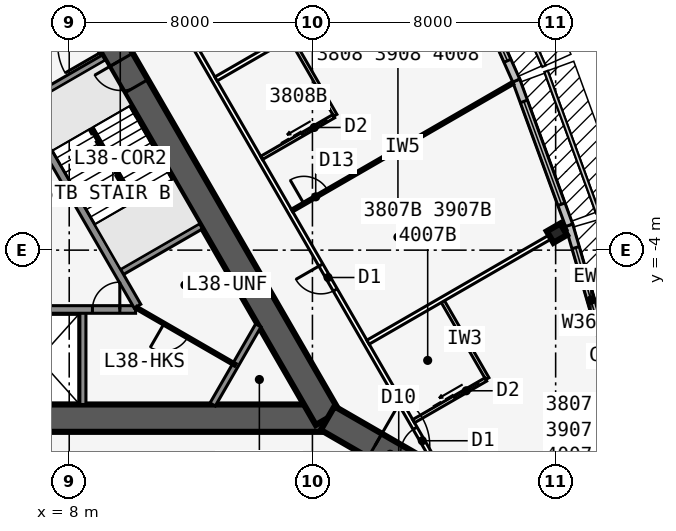
"""IFC4 building model, lengths in metres.
Left out: names, types, materials, properties, quantities, classifications, styles, units other than length and angle.
Written with IfcOpenShell. Run it as: python <this file> out.ifc"""

import sys

from ifc_helpers import new_model, si_unit, direction, frame, frame_2d, origin, origin_2d, place, context, subcontext, project, spatial, rectangle, i_section, extrude, element, fill, save


model = new_model("IFC4")
c1 = context("Model", 3, precision=1e-05, world=origin(), true_north=direction((0.0, 1.0)))
c2 = subcontext(c1, "Body", "Model", "MODEL_VIEW")
j1 = project(units=[si_unit("LENGTHUNIT", "METRE"), si_unit("PLANEANGLEUNIT", "RADIAN")], contexts=[c1])
p1 = place(None, origin())
s1 = spatial("IfcSite", under=j1, at=p1, CompositionType="ELEMENT")
p2 = place(p1, origin())
s2 = spatial("IfcBuilding", under=s1, at=p2, CompositionType="ELEMENT")
p3 = place(p2, frame((0.0, 0.0, 145.3)))
s3 = spatial("IfcBuildingStorey", under=s2, at=p3, CompositionType="ELEMENT", Elevation=145.3)
p4 = place(p3, frame((-16.5, -9.526, 0.0), z_axis=(0.0, 0.0, 1.0), x_axis=(1.0, 0.0, 0.0)))
e1 = element("IfcWall", 1, at=p4, inside=s3, PredefinedType="SHEAR", context=c2, shape_type="SweptSolid", body=[
    extrude(rectangle(XDim=33.0, YDim=0.9, at=frame_2d((16.5, 0.0))), origin(), (0.0, 0.0, 1.0), 3.4),
])
p5 = place(p4, frame((14.05, 0.0, 0.0)))
e2 = element("IfcOpeningElement", 2, at=p5, cuts=e1, PredefinedType="OPENING", context=c2, shape_type="SweptSolid", body=[
    extrude(rectangle(XDim=1.8, YDim=2.13, at=frame_2d((0.9, 1.065))), frame((0.0, 0.46, 0.0), z_axis=(0.0, -1.0, 0.0), x_axis=(1.0, 0.0, 0.0)), (0.0, 0.0, 1.0), 0.92),
])
p6 = place(p3, frame((-0.55, -5.951, 0.0), z_axis=(0.0, 0.0, 1.0), x_axis=(1.0, 0.0, 0.0)))
e3 = element("IfcWall", 3, at=p6, inside=s3, PredefinedType="SOLIDWALL", context=c2, shape_type="SweptSolid", body=[
    extrude(rectangle(XDim=10.733, YDim=0.25, at=frame_2d((5.366, 0.0))), origin(), (0.0, 0.0, 1.0), 3.235),
])
p7 = place(p6, frame((9.314, 0.0, 0.0)))
e4 = element("IfcOpeningElement", 4, at=p7, cuts=e3, PredefinedType="OPENING", context=c2, shape_type="SweptSolid", body=[
    extrude(rectangle(XDim=0.9, YDim=2.13, at=frame_2d((0.45, 1.065))), frame((0.0, 0.135, 0.0), z_axis=(0.0, -1.0, 0.0), x_axis=(1.0, 0.0, 0.0)), (0.0, 0.0, 1.0), 0.27),
])
p8 = place(p6, frame((1.05, 0.0, 0.0)))
e5 = element("IfcOpeningElement", 5, at=p8, cuts=e3, PredefinedType="OPENING", context=c2, shape_type="SweptSolid", body=[
    extrude(rectangle(XDim=1.1, YDim=2.13, at=frame_2d((0.55, 1.065))), frame((0.0, 0.135, 0.0), z_axis=(0.0, -1.0, 0.0), x_axis=(1.0, 0.0, 0.0)), (0.0, 0.0, 1.0), 0.27),
])
p9 = place(p6, frame((4.05, 0.0, 0.0)))
e6 = element("IfcOpeningElement", 6, at=p9, cuts=e3, PredefinedType="OPENING", context=c2, shape_type="SweptSolid", body=[
    extrude(rectangle(XDim=1.1, YDim=2.13, at=frame_2d((0.55, 1.065))), frame((0.0, 0.135, 0.0), z_axis=(0.0, -1.0, 0.0), x_axis=(1.0, 0.0, 0.0)), (0.0, 0.0, 1.0), 0.27),
])
p10 = place(p3, frame((8.45, -5.951, 0.0), z_axis=(0.0, 0.0, 1.0), x_axis=(0.0, -1.0, 0.0)))
e7 = element("IfcWall", 7, at=p10, inside=s3, PredefinedType="SOLIDWALL", context=c2, shape_type="SweptSolid", body=[
    extrude(rectangle(XDim=3.125, YDim=0.2, at=frame_2d((1.562, 0.0))), origin(), (0.0, 0.0, 1.0), 3.235),
])
p11 = place(p3, frame((16.5, -9.526, 0.0), z_axis=(0.0, 0.0, 1.0), x_axis=(-0.499999749417, 0.866025548458, 0.0)))
e8 = element("IfcWall", 8, at=p11, inside=s3, PredefinedType="SHEAR", context=c2, shape_type="SweptSolid", body=[
    extrude(rectangle(XDim=33.0, YDim=0.9, at=frame_2d((16.5, 0.0))), origin(), (0.0, 0.0, 1.0), 3.4),
])
p12 = place(p11, frame((14.15, 0.0, 0.0)))
e9 = element("IfcOpeningElement", 9, at=p12, cuts=e8, PredefinedType="OPENING", context=c2, shape_type="SweptSolid", body=[
    extrude(rectangle(XDim=1.8, YDim=2.13, at=frame_2d((0.9, 1.065))), frame((0.0, 0.46, 0.0), z_axis=(0.0, -1.0, 0.0), x_axis=(1.0, 0.0, 0.0)), (0.0, 0.0, 1.0), 0.92),
])
p13 = place(p11, frame((12.6, 0.0, 0.0)))
e10 = element("IfcOpeningElement", 10, at=p13, cuts=e8, PredefinedType="OPENING", context=c2, shape_type="SweptSolid", body=[
    extrude(rectangle(XDim=1.0, YDim=2.13, at=frame_2d((0.5, 1.065))), frame((0.0, 0.46, 0.0), z_axis=(0.0, -1.0, 0.0), x_axis=(1.0, 0.0, 0.0)), (0.0, 0.0, 1.0), 0.92),
])
p14 = place(p3, frame((10.245, -5.843, 0.0), z_axis=(0.0, 0.0, 1.0), x_axis=(-0.499993009313, 0.866029439822, 0.0)))
e11 = element("IfcWall", 11, at=p14, inside=s3, PredefinedType="SOLIDWALL", context=c2, shape_type="SweptSolid", body=[
    extrude(rectangle(XDim=7.733, YDim=0.25, at=frame_2d((3.866, 0.0))), origin(), (0.0, 0.0, 1.0), 3.235),
])
for number, where, z_axis, x_axis in (
    (12, (9.629, -4.775, 0.0), (0.0, 0.0, 1.0), (0.866, 0.5, 0.0)),
    (13, (6.429, 0.767, 0.0), (0.0, 0.0, 1.0), (0.866, 0.5, 0.0)),
):
    element("IfcWall", number, at=place(p3, frame(where, z_axis=z_axis, x_axis=x_axis)), inside=s3, PredefinedType="SOLIDWALL", context=c2, shape_type="SweptSolid", body=[
        extrude(rectangle(XDim=3.125, YDim=0.2, at=frame_2d((1.562, 0.0))), origin(), (0.0, 0.0, 1.0), 3.235),
    ])
p15 = place(p3, frame((16.5, -9.526, 0.0), z_axis=(0.0, 0.0, 1.0), x_axis=(0.866031398331, -0.499989616998, 0.0)))
e14 = element("IfcWall", 14, at=p15, inside=s3, PredefinedType="SHEAR", context=c2, shape_type="SweptSolid", body=[
    extrude(rectangle(XDim=4.746, YDim=0.9, at=frame_2d((2.373, 0.0))), origin(), (0.0, 0.0, 1.0), 3.4),
])
p16 = place(p15, frame((1.8, 0.0, 0.0)))
e15 = element("IfcOpeningElement", 15, at=p16, cuts=e14, PredefinedType="OPENING", context=c2, shape_type="SweptSolid", body=[
    extrude(rectangle(XDim=1.8, YDim=2.13, at=frame_2d((0.9, 1.065))), frame((0.0, 0.46, 0.0), z_axis=(0.0, -1.0, 0.0), x_axis=(1.0, 0.0, 0.0)), (0.0, 0.0, 1.0), 0.92),
])
p17 = place(p3, frame((24.041, -3.44, 0.0), z_axis=(0.0, 0.0, 1.0), x_axis=(-0.5, 0.866025403784, 0.0)))
e16 = element("IfcColumn", 16, at=p17, inside=s3, PredefinedType="COLUMN", context=c2, shape_type="SweptSolid", body=[
    extrude(i_section(OverallWidth=0.437, OverallDepth=0.513, WebThickness=0.061, FlangeThickness=0.097, at=origin_2d()), origin(), (0.0, 0.0, 1.0), 3.4),
])
p18 = place(p3, frame((25.88, -8.118, 0.0), z_axis=(0.0, 0.0, 1.0), x_axis=(-0.279528287117, 0.960137457191, 0.0)))
e17 = element("IfcWall", 17, at=p18, inside=s3, PredefinedType="STANDARD", context=c2, shape_type="SweptSolid", body=[
    extrude(rectangle(XDim=5.148, YDim=0.25, at=frame_2d((2.574, 0.0))), origin(), (0.0, 0.0, 1.0), 3.235),
])
p19 = place(p18, frame((0.774, 0.0, 0.45)))
e18 = element("IfcOpeningElement", 18, at=p19, cuts=e17, PredefinedType="OPENING", context=c2, shape_type="SweptSolid", body=[
    extrude(rectangle(XDim=3.6, YDim=2.4, at=frame_2d((1.8, 1.2))), frame((0.0, 0.135, 0.0), z_axis=(0.0, -1.0, 0.0), x_axis=(1.0, 0.0, 0.0)), (0.0, 0.0, 1.0), 0.27),
])
p20 = place(p3, frame((24.444, -3.183, 0.0), z_axis=(0.0, 0.0, 1.0), x_axis=(-0.343225593282, 0.939252996863, 0.0)))
e19 = element("IfcWall", 19, at=p20, inside=s3, PredefinedType="STANDARD", context=c2, shape_type="SweptSolid", body=[
    extrude(rectangle(XDim=5.076, YDim=0.25, at=frame_2d((2.538, 0.0))), origin(), (0.0, 0.0, 1.0), 3.235),
])
p21 = place(p20, frame((0.738, 0.0, 0.45)))
e20 = element("IfcOpeningElement", 20, at=p21, cuts=e19, PredefinedType="OPENING", context=c2, shape_type="SweptSolid", body=[
    extrude(rectangle(XDim=3.6, YDim=2.4, at=frame_2d((1.8, 1.2))), frame((0.0, 0.135, 0.0), z_axis=(0.0, -1.0, 0.0), x_axis=(1.0, 0.0, 0.0)), (0.0, 0.0, 1.0), 0.27),
])
p22 = place(p3, frame((22.705, 1.576, 0.0), z_axis=(0.0, 0.0, 1.0), x_axis=(-0.406832200364, 0.913502906808, 0.0)))
e21 = element("IfcWall", 21, at=p22, inside=s3, PredefinedType="STANDARD", context=c2, shape_type="SweptSolid", body=[
    extrude(rectangle(XDim=5.028, YDim=0.25, at=frame_2d((2.514, 0.0))), origin(), (0.0, 0.0, 1.0), 3.235),
])
p23 = place(p22, frame((0.714, 0.0, 0.45)))
e22 = element("IfcOpeningElement", 22, at=p23, cuts=e21, PredefinedType="OPENING", context=c2, shape_type="SweptSolid", body=[
    extrude(rectangle(XDim=3.6, YDim=2.4, at=frame_2d((1.8, 1.2))), frame((0.0, 0.135, 0.0), z_axis=(0.0, -1.0, 0.0), x_axis=(1.0, 0.0, 0.0)), (0.0, 0.0, 1.0), 0.27),
])
p24 = place(p3, frame((20.027, -10.985, 0.0), z_axis=(0.0, 0.0, 1.0), x_axis=(-0.500001677587, 0.866024435227, 0.0)))
e23 = element("IfcWall", 23, at=p24, inside=s3, PredefinedType="PARTITIONING", context=c2, shape_type="SweptSolid", body=[
    extrude(rectangle(XDim=39.054, YDim=0.15, at=frame_2d((19.527, 0.0))), origin(), (0.0, 0.0, 1.0), 3.235),
])
p25 = place(p24, frame((0.352, 0.0, 0.0)))
e24 = element("IfcOpeningElement", 24, at=p25, cuts=e23, PredefinedType="OPENING", context=c2, shape_type="SweptSolid", body=[
    extrude(rectangle(XDim=0.95, YDim=2.13, at=frame_2d((0.475, 1.065))), frame((0.0, 0.085, 0.0), z_axis=(0.0, -1.0, 0.0), x_axis=(1.0, 0.0, 0.0)), (0.0, 0.0, 1.0), 0.17),
])
p26 = place(p24, frame((6.552, 0.0, 0.0)))
e25 = element("IfcOpeningElement", 25, at=p26, cuts=e23, PredefinedType="OPENING", context=c2, shape_type="SweptSolid", body=[
    extrude(rectangle(XDim=0.95, YDim=2.13, at=frame_2d((0.475, 1.065))), frame((0.0, 0.085, 0.0), z_axis=(0.0, -1.0, 0.0), x_axis=(1.0, 0.0, 0.0)), (0.0, 0.0, 1.0), 0.17),
])
p27 = place(p24, frame((17.152, 0.0, 0.0)))
e26 = element("IfcOpeningElement", 26, at=p27, cuts=e23, PredefinedType="OPENING", context=c2, shape_type="SweptSolid", body=[
    extrude(rectangle(XDim=0.95, YDim=2.13, at=frame_2d((0.475, 1.065))), frame((0.0, 0.085, 0.0), z_axis=(0.0, -1.0, 0.0), x_axis=(1.0, 0.0, 0.0)), (0.0, 0.0, 1.0), 0.17),
])
p28 = place(p24, frame((21.552, 0.0, 0.0)))
e27 = element("IfcOpeningElement", 27, at=p28, cuts=e23, PredefinedType="OPENING", context=c2, shape_type="SweptSolid", body=[
    extrude(rectangle(XDim=0.95, YDim=2.13, at=frame_2d((0.475, 1.065))), frame((0.0, 0.085, 0.0), z_axis=(0.0, -1.0, 0.0), x_axis=(1.0, 0.0, 0.0)), (0.0, 0.0, 1.0), 0.17),
])
p29 = place(p24, frame((32.152, 0.0, 0.0)))
e28 = element("IfcOpeningElement", 28, at=p29, cuts=e23, PredefinedType="OPENING", context=c2, shape_type="SweptSolid", body=[
    extrude(rectangle(XDim=0.95, YDim=2.13, at=frame_2d((0.475, 1.065))), frame((0.0, 0.085, 0.0), z_axis=(0.0, -1.0, 0.0), x_axis=(1.0, 0.0, 0.0)), (0.0, 0.0, 1.0), 0.17),
])
p30 = place(p24, frame((37.752, 0.0, 0.0)))
e29 = element("IfcOpeningElement", 29, at=p30, cuts=e23, PredefinedType="OPENING", context=c2, shape_type="SweptSolid", body=[
    extrude(rectangle(XDim=0.95, YDim=2.13, at=frame_2d((0.475, 1.065))), frame((0.0, 0.085, 0.0), z_axis=(0.0, -1.0, 0.0), x_axis=(1.0, 0.0, 0.0)), (0.0, 0.0, 1.0), 0.17),
])
p31 = place(p3, frame((17.829, -7.027, 0.0), z_axis=(0.0, 0.0, 1.0), x_axis=(0.866029804378, 0.499992377871, 0.0)))
e30 = element("IfcWall", 30, at=p31, inside=s3, PredefinedType="PARTITIONING", context=c2, shape_type="SweptSolid", body=[
    extrude(rectangle(XDim=7.516, YDim=0.15, at=frame_2d((3.758, 0.0))), origin(), (0.0, 0.0, 1.0), 2.389),
])
p32 = place(p3, frame((15.329, -2.697, 0.0), z_axis=(0.0, 0.0, 1.0), x_axis=(0.866024316602, 0.50000188305, 0.0)))
e31 = element("IfcWall", 31, at=p32, inside=s3, PredefinedType="PARTITIONING", context=c2, shape_type="SweptSolid", body=[
    extrude(rectangle(XDim=8.395, YDim=0.1, at=frame_2d((4.198, 0.0))), origin(), (0.0, 0.0, 1.0), 2.389),
])
p33 = place(p32, frame((0.45, 0.0, 0.0)))
e32 = element("IfcOpeningElement", 32, at=p33, cuts=e31, PredefinedType="OPENING", context=c2, shape_type="SweptSolid", body=[
    extrude(rectangle(XDim=0.9, YDim=2.13, at=frame_2d((0.45, 1.065))), frame((0.0, 0.06, 0.0), z_axis=(0.0, -1.0, 0.0), x_axis=(1.0, 0.0, 0.0)), (0.0, 0.0, 1.0), 0.12),
])
p34 = place(p3, frame((12.829, 1.633, 0.0), z_axis=(0.0, 0.0, 1.0), x_axis=(0.866027015393, 0.499997208602, 0.0)))
e33 = element("IfcWall", 33, at=p34, inside=s3, PredefinedType="PARTITIONING", context=c2, shape_type="SweptSolid", body=[
    extrude(rectangle(XDim=8.922, YDim=0.15, at=frame_2d((4.461, 0.0))), origin(), (0.0, 0.0, 1.0), 2.389),
])
p35 = place(p3, frame((21.753, -8.225, 0.0), z_axis=(0.0, 0.0, 1.0), x_axis=(-0.499990139034, 0.866031096941, 0.0)))
e34 = element("IfcWall", 34, at=p35, inside=s3, PredefinedType="PLUMBINGWALL", context=c2, shape_type="SweptSolid", body=[
    extrude(rectangle(XDim=3.0, YDim=0.12, at=frame_2d((1.5, 0.0))), origin(), (0.0, 0.0, 1.0), 3.235),
])
p36 = place(p3, frame((19.329, -9.625, 0.0), z_axis=(0.0, 0.0, 1.0), x_axis=(0.866035715982, 0.499982138324, 0.0)))
e35 = element("IfcWall", 35, at=p36, inside=s3, PredefinedType="PLUMBINGWALL", context=c2, shape_type="SweptSolid", body=[
    extrude(rectangle(XDim=2.74, YDim=0.12, at=frame_2d((1.37, 0.0))), origin(), (0.0, 0.0, 1.0), 3.235),
])
p37 = place(p36, frame((1.55, 0.0, 0.0)))
e36 = element("IfcOpeningElement", 36, at=p37, cuts=e35, PredefinedType="OPENING", context=c2, shape_type="SweptSolid", body=[
    extrude(rectangle(XDim=0.9, YDim=2.13, at=frame_2d((0.45, 1.065))), frame((0.0, 0.07, 0.0), z_axis=(0.0, -1.0, 0.0), x_axis=(1.0, 0.0, 0.0)), (0.0, 0.0, 1.0), 0.14),
])
p38 = place(p3, frame((16.753, 0.435, 0.0), z_axis=(0.0, 0.0, 1.0), x_axis=(-0.499990139034, 0.866031096941, 0.0)))
e37 = element("IfcWall", 37, at=p38, inside=s3, PredefinedType="PLUMBINGWALL", context=c2, shape_type="SweptSolid", body=[
    extrude(rectangle(XDim=3.0, YDim=0.12, at=frame_2d((1.5, 0.0))), origin(), (0.0, 0.0, 1.0), 3.235),
])
p39 = place(p3, frame((14.329, -0.965, 0.0), z_axis=(0.0, 0.0, 1.0), x_axis=(0.866035715982, 0.499982138324, 0.0)))
e38 = element("IfcWall", 38, at=p39, inside=s3, PredefinedType="PLUMBINGWALL", context=c2, shape_type="SweptSolid", body=[
    extrude(rectangle(XDim=2.74, YDim=0.12, at=frame_2d((1.37, 0.0))), origin(), (0.0, 0.0, 1.0), 3.235),
])
p40 = place(p39, frame((1.55, 0.0, 0.0)))
e39 = element("IfcOpeningElement", 39, at=p40, cuts=e38, PredefinedType="OPENING", context=c2, shape_type="SweptSolid", body=[
    extrude(rectangle(XDim=0.9, YDim=2.13, at=frame_2d((0.45, 1.065))), frame((0.0, 0.07, 0.0), z_axis=(0.0, -1.0, 0.0), x_axis=(1.0, 0.0, 0.0)), (0.0, 0.0, 1.0), 0.14),
])
p41 = place(p3, frame((14.219, -6.476, 0.0), z_axis=(0.0, 0.0, 1.0), x_axis=(-0.499952404951, -0.866052881055, 0.0)))
e40 = element("IfcWall", 40, at=p41, inside=s3, PredefinedType="SOLIDWALL", context=c2, shape_type="SweptSolid", body=[
    extrude(rectangle(XDim=3.002, YDim=0.2, at=frame_2d((1.501, 0.0))), origin(), (0.0, 0.0, 1.0), 3.235),
])
p42 = place(p3, frame((13.469, -7.776, 0.0), z_axis=(0.0, 0.0, 1.0), x_axis=(-0.866021898093, 0.500006071987, 0.0)))
e41 = element("IfcWall", 41, at=p42, inside=s3, PredefinedType="PARTITIONING", context=c2, shape_type="SweptSolid", body=[
    extrude(rectangle(XDim=3.775, YDim=0.1, at=frame_2d((1.888, 0.0))), origin(), (0.0, 0.0, 1.0), 3.235),
])
p43 = place(p42, frame((1.815, 0.0, 0.0)))
e42 = element("IfcOpeningElement", 42, at=p43, cuts=e41, PredefinedType="OPENING", context=c2, shape_type="SweptSolid", body=[
    extrude(rectangle(XDim=0.9, YDim=2.13, at=frame_2d((0.45, 1.065))), frame((0.0, 0.06, 0.0), z_axis=(0.0, -1.0, 0.0), x_axis=(1.0, 0.0, 0.0)), (0.0, 0.0, 1.0), 0.12),
])
p44 = place(p3, frame((10.135, -2.401, 0.0), z_axis=(0.0, 0.0, 1.0), x_axis=(-0.499992232847, 0.866029888106, 0.0)))
e43 = element("IfcWall", 43, at=p44, inside=s3, PredefinedType="SOLIDWALL", context=c2, shape_type="SweptSolid", body=[
    extrude(rectangle(XDim=2.794, YDim=0.1, at=frame_2d((1.397, 0.0))), origin(), (0.0, 0.0, 1.0), 3.4),
])
p45 = place(p19, origin())
e44 = element("IfcWindow", 44, at=p45, inside=s3, PartitioningType="SINGLE_PANEL", PredefinedType="WINDOW", context=c2, shape_type="SweptSolid", body=[
    extrude(rectangle(XDim=3.6, YDim=2.4, at=frame_2d((1.8, 1.2))), frame((0.0, 0.03, 0.0), z_axis=(0.0, -1.0, 0.0), x_axis=(1.0, 0.0, 0.0)), (0.0, 0.0, 1.0), 0.06),
])
fill(e18, e44)
p46 = place(p21, origin())
e45 = element("IfcWindow", 45, at=p46, inside=s3, PartitioningType="SINGLE_PANEL", PredefinedType="WINDOW", context=c2, shape_type="SweptSolid", body=[
    extrude(rectangle(XDim=3.6, YDim=2.4, at=frame_2d((1.8, 1.2))), frame((0.0, 0.03, 0.0), z_axis=(0.0, -1.0, 0.0), x_axis=(1.0, 0.0, 0.0)), (0.0, 0.0, 1.0), 0.06),
])
fill(e20, e45)
p47 = place(p23, origin())
e46 = element("IfcWindow", 46, at=p47, inside=s3, PartitioningType="SINGLE_PANEL", PredefinedType="WINDOW", context=c2, shape_type="SweptSolid", body=[
    extrude(rectangle(XDim=3.6, YDim=2.4, at=frame_2d((1.8, 1.2))), frame((0.0, 0.03, 0.0), z_axis=(0.0, -1.0, 0.0), x_axis=(1.0, 0.0, 0.0)), (0.0, 0.0, 1.0), 0.06),
])
fill(e22, e46)
p48 = place(p33, origin())
e47 = element("IfcDoor", 47, at=p48, inside=s3, OperationType="SINGLE_SWING_LEFT", PredefinedType="DOOR", context=c2, shape_type="SweptSolid", body=[
    extrude(rectangle(XDim=0.9, YDim=2.13, at=frame_2d((0.45, 1.065))), frame((0.0, 0.025, 0.0), z_axis=(0.0, -1.0, 0.0), x_axis=(1.0, 0.0, 0.0)), (0.0, 0.0, 1.0), 0.05),
])
fill(e32, e47)
p49 = place(p37, origin())
e48 = element("IfcDoor", 48, at=p49, inside=s3, OperationType="SLIDING_TO_LEFT", PredefinedType="DOOR", context=c2, shape_type="SweptSolid", body=[
    extrude(rectangle(XDim=0.9, YDim=2.13, at=frame_2d((0.45, 1.065))), frame((0.0, 0.025, 0.0), z_axis=(0.0, -1.0, 0.0), x_axis=(1.0, 0.0, 0.0)), (0.0, 0.0, 1.0), 0.05),
])
fill(e36, e48)
p50 = place(p25, origin())
e49 = element("IfcDoor", 49, at=p50, inside=s3, OperationType="SINGLE_SWING_LEFT", PredefinedType="DOOR", context=c2, shape_type="SweptSolid", body=[
    extrude(rectangle(XDim=0.95, YDim=2.13, at=frame_2d((0.475, 1.065))), frame((0.0, 0.025, 0.0), z_axis=(0.0, -1.0, 0.0), x_axis=(1.0, 0.0, 0.0)), (0.0, 0.0, 1.0), 0.05),
])
fill(e24, e49)
p51 = place(p26, origin())
e50 = element("IfcDoor", 50, at=p51, inside=s3, OperationType="SINGLE_SWING_RIGHT", PredefinedType="DOOR", context=c2, shape_type="SweptSolid", body=[
    extrude(rectangle(XDim=0.95, YDim=2.13, at=frame_2d((0.475, 1.065))), frame((0.0, 0.025, 0.0), z_axis=(0.0, -1.0, 0.0), x_axis=(1.0, 0.0, 0.0)), (0.0, 0.0, 1.0), 0.05),
])
fill(e25, e50)
p52 = place(p40, origin())
e51 = element("IfcDoor", 51, at=p52, inside=s3, OperationType="SLIDING_TO_LEFT", PredefinedType="DOOR", context=c2, shape_type="SweptSolid", body=[
    extrude(rectangle(XDim=0.9, YDim=2.13, at=frame_2d((0.45, 1.065))), frame((0.0, 0.025, 0.0), z_axis=(0.0, -1.0, 0.0), x_axis=(1.0, 0.0, 0.0)), (0.0, 0.0, 1.0), 0.05),
])
fill(e39, e51)
p53 = place(p13, origin())
e52 = element("IfcDoor", 52, at=p53, inside=s3, OperationType="SINGLE_SWING_RIGHT", PredefinedType="DOOR", context=c2, shape_type="SweptSolid", body=[
    extrude(rectangle(XDim=1.0, YDim=2.13, at=frame_2d((0.5, 1.065))), frame((0.0, 0.025, 0.0), z_axis=(0.0, -1.0, 0.0), x_axis=(1.0, 0.0, 0.0)), (0.0, 0.0, 1.0), 0.05),
])
fill(e10, e52)
p54 = place(p16, origin())
e53 = element("IfcDoor", 53, at=p54, inside=s3, OperationType="DOUBLE_DOOR_DOUBLE_SWING", PredefinedType="DOOR", context=c2, shape_type="SweptSolid", body=[
    extrude(rectangle(XDim=1.8, YDim=2.13, at=frame_2d((0.9, 1.065))), frame((0.0, 0.025, 0.0), z_axis=(0.0, -1.0, 0.0), x_axis=(1.0, 0.0, 0.0)), (0.0, 0.0, 1.0), 0.05),
])
fill(e15, e53)
p55 = place(p7, origin())
e54 = element("IfcDoor", 54, at=p55, inside=s3, OperationType="SINGLE_SWING_RIGHT", PredefinedType="DOOR", context=c2, shape_type="SweptSolid", body=[
    extrude(rectangle(XDim=0.9, YDim=2.13, at=frame_2d((0.45, 1.065))), frame((0.0, 0.025, 0.0), z_axis=(0.0, -1.0, 0.0), x_axis=(1.0, 0.0, 0.0)), (0.0, 0.0, 1.0), 0.05),
])
fill(e4, e54)
p56 = place(p43, origin())
e55 = element("IfcDoor", 55, at=p56, inside=s3, OperationType="SINGLE_SWING_RIGHT", PredefinedType="DOOR", context=c2, shape_type="SweptSolid", body=[
    extrude(rectangle(XDim=0.9, YDim=2.13, at=frame_2d((0.45, 1.065))), frame((0.0, 0.025, 0.0), z_axis=(0.0, -1.0, 0.0), x_axis=(1.0, 0.0, 0.0)), (0.0, 0.0, 1.0), 0.05),
])
fill(e42, e55)
save(model, sys.argv[1])
